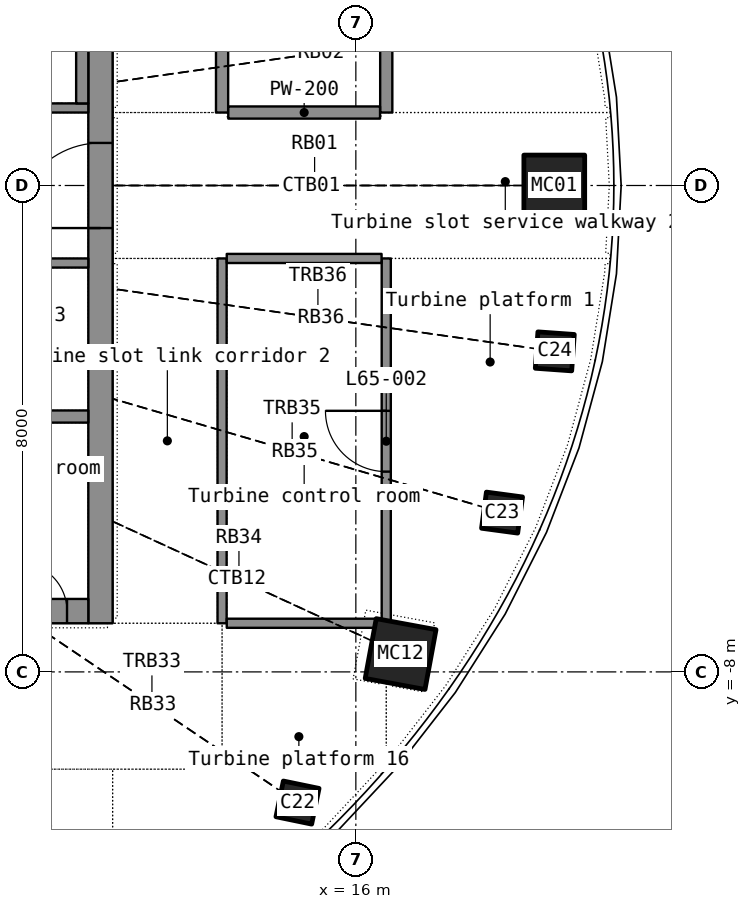
"""IFC4 building model, lengths in metres.
Left out: names, types, materials, properties, quantities, classifications, styles, units other than length and angle.
Written with IfcOpenShell. Run it as: python <this file> out.ifc"""

import sys

from ifc_helpers import new_model, si_unit, direction, frame, frame_2d, origin, origin_2d, place, context, subcontext, project, spatial, rectangle, hollow_rectangle, extrude, element, fill, save


model = new_model("IFC4")
c1 = context("Model", 3, precision=1e-05, world=origin(), true_north=direction((0.0, 1.0)))
c2 = subcontext(c1, "Body", "Model", "MODEL_VIEW")
j1 = project(units=[si_unit("LENGTHUNIT", "METRE"), si_unit("PLANEANGLEUNIT", "RADIAN")], contexts=[c1])
p1 = place(None, origin())
s1 = spatial("IfcSite", under=j1, at=p1, CompositionType="ELEMENT")
p2 = place(p1, origin())
s2 = spatial("IfcBuilding", under=s1, at=p2, CompositionType="ELEMENT")
p3 = place(p2, frame((0.0, 0.0, 265.2)))
s3 = spatial("IfcBuildingStorey", under=s2, at=p3, CompositionType="ELEMENT", Elevation=265.2)
p4 = place(p3, frame((19.263, 0.0, 0.0), z_axis=(-0.034587192, 0.0, 0.999401684), x_axis=(0.0, -1.0, 0.0)))
e1 = element("IfcColumn", 1, at=p4, inside=s3, PredefinedType="COLUMN", context=c2, shape_type="SweptSolid", body=[
    extrude(hollow_rectangle(XDim=1.0, YDim=1.0, WallThickness=0.032, at=origin_2d()), origin(), (0.0, 0.0, 1.0), 7.405),
])
p5 = place(p3, frame((15.041, -10.149, 0.0), z_axis=(-0.026511305, 0.018201791, 0.999482789), x_axis=(-0.721084308, -0.692816746, -0.006509747)))
e2 = element("IfcColumn", 2, at=p5, inside=s3, PredefinedType="COLUMN", context=c2, shape_type="SweptSolid", body=[
    extrude(hollow_rectangle(XDim=0.6, YDim=0.6, WallThickness=0.025, at=origin_2d()), origin(), (0.0, 0.0, 1.0), 7.404),
])
p6 = place(p3, frame((16.736, -7.706, 0.0), z_axis=(-0.02993968, 0.014178483, 0.999451142), x_axis=(-0.58479336, -0.811160032, -0.006010807)))
e3 = element("IfcColumn", 3, at=p6, inside=s3, PredefinedType="COLUMN", context=c2, shape_type="SweptSolid", body=[
    extrude(hollow_rectangle(XDim=1.0, YDim=1.0, WallThickness=0.032, at=origin_2d()), origin(), (0.0, 0.0, 1.0), 7.404),
])
p7 = place(p3, frame((18.404, -5.38, 0.0), z_axis=(-0.032477793, 0.009660907, 0.999425765), x_axis=(-0.410307078, -0.911936229, -0.004518332)))
e4 = element("IfcColumn", 4, at=p7, inside=s3, PredefinedType="COLUMN", context=c2, shape_type="SweptSolid", body=[
    extrude(hollow_rectangle(XDim=0.6, YDim=0.6, WallThickness=0.025, at=origin_2d()), origin(), (0.0, 0.0, 1.0), 7.404),
])
p8 = place(p3, frame((19.272, -2.728, 0.0), z_axis=(-0.034059852, 0.004912796, 0.99940772), x_axis=(-0.21296706, -0.977056295, -0.002455003)))
e5 = element("IfcColumn", 5, at=p8, inside=s3, PredefinedType="COLUMN", context=c2, shape_type="SweptSolid", body=[
    extrude(hollow_rectangle(XDim=0.6, YDim=0.6, WallThickness=0.025, at=origin_2d()), origin(), (0.0, 0.0, 1.0), 7.405),
])
p9 = place(p3, frame((11.8, -7.2, 0.0), z_axis=(0.0, 0.0, 1.0), x_axis=(0.0, 1.0, 0.0)))
e6 = element("IfcWall", 6, at=p9, inside=s3, PredefinedType="SHEAR", context=c2, shape_type="SweptSolid", body=[
    extrude(rectangle(XDim=14.4, YDim=0.4, at=frame_2d((7.2, 0.0))), origin(), (0.0, 0.0, 1.0), 6.9),
])
p10 = place(p9, frame((6.5, 0.0, 0.0)))
e7 = element("IfcOpeningElement", 7, at=p10, cuts=e6, PredefinedType="OPENING", context=c2, shape_type="SweptSolid", body=[
    extrude(rectangle(XDim=1.4, YDim=2.2, at=frame_2d((0.7, 1.1))), frame((0.0, 0.21, 0.0), z_axis=(0.0, -1.0, 0.0), x_axis=(1.0, 0.0, 0.0)), (0.0, 0.0, 1.0), 0.42),
])
p11 = place(p3, frame((-11.6, -7.0, 0.0), z_axis=(0.0, 0.0, 1.0), x_axis=(1.0, 0.0, 0.0)))
e8 = element("IfcWall", 8, at=p11, inside=s3, PredefinedType="SHEAR", context=c2, shape_type="SweptSolid", body=[
    extrude(rectangle(XDim=23.2, YDim=0.4, at=frame_2d((11.6, 0.0))), origin(), (0.0, 0.0, 1.0), 6.9),
])
p12 = place(p11, frame((20.05, 0.0, 0.0)))
e9 = element("IfcOpeningElement", 9, at=p12, cuts=e8, PredefinedType="OPENING", context=c2, shape_type="SweptSolid", body=[
    extrude(rectangle(XDim=1.1, YDim=2.2, at=frame_2d((0.55, 1.1))), frame((0.0, 0.21, 0.0), z_axis=(0.0, -1.0, 0.0), x_axis=(1.0, 0.0, 0.0)), (0.0, 0.0, 1.0), 0.42),
])
p13 = place(p11, frame((4.15, 0.0, 0.0)))
e10 = element("IfcOpeningElement", 10, at=p13, cuts=e8, PredefinedType="OPENING", context=c2, shape_type="SweptSolid", body=[
    extrude(rectangle(XDim=0.9, YDim=2.1, at=frame_2d((0.45, 1.05))), frame((0.0, 0.21, 0.0), z_axis=(0.0, -1.0, 0.0), x_axis=(1.0, 0.0, 0.0)), (0.0, 0.0, 1.0), 0.42),
])
p14 = place(p11, frame((11.15, 0.0, 0.0)))
e11 = element("IfcOpeningElement", 11, at=p14, cuts=e8, PredefinedType="OPENING", context=c2, shape_type="SweptSolid", body=[
    extrude(rectangle(XDim=0.9, YDim=2.1, at=frame_2d((0.45, 1.05))), frame((0.0, 0.21, 0.0), z_axis=(0.0, -1.0, 0.0), x_axis=(1.0, 0.0, 0.0)), (0.0, 0.0, 1.0), 0.42),
])
p15 = place(p11, frame((17.15, 0.0, 0.0)))
e12 = element("IfcOpeningElement", 12, at=p15, cuts=e8, PredefinedType="OPENING", context=c2, shape_type="SweptSolid", body=[
    extrude(rectangle(XDim=0.9, YDim=2.1, at=frame_2d((0.45, 1.05))), frame((0.0, 0.21, 0.0), z_axis=(0.0, -1.0, 0.0), x_axis=(1.0, 0.0, 0.0)), (0.0, 0.0, 1.0), 0.42),
])
p16 = place(p11, frame((0.35, 0.0, 0.0)))
e13 = element("IfcOpeningElement", 13, at=p16, cuts=e8, PredefinedType="OPENING", context=c2, shape_type="SweptSolid", body=[
    extrude(rectangle(XDim=0.8, YDim=2.05, at=frame_2d((0.4, 1.025))), frame((0.0, 0.21, 0.0), z_axis=(0.0, -1.0, 0.0), x_axis=(1.0, 0.0, 0.0)), (0.0, 0.0, 1.0), 0.42),
])
p17 = place(p11, frame((22.05, 0.0, 0.0)))
e14 = element("IfcOpeningElement", 14, at=p17, cuts=e8, PredefinedType="OPENING", context=c2, shape_type="SweptSolid", body=[
    extrude(rectangle(XDim=0.8, YDim=2.05, at=frame_2d((0.4, 1.025))), frame((0.0, 0.21, 0.0), z_axis=(0.0, -1.0, 0.0), x_axis=(1.0, 0.0, 0.0)), (0.0, 0.0, 1.0), 0.42),
])
p18 = place(p3, frame((-11.6, -3.8, 0.0), z_axis=(0.0, 0.0, 1.0), x_axis=(1.0, 0.0, 0.0)))
e15 = element("IfcWall", 15, at=p18, inside=s3, PredefinedType="SHEAR", context=c2, shape_type="SweptSolid", body=[
    extrude(rectangle(XDim=23.2, YDim=0.2, at=frame_2d((11.6, 0.0))), origin(), (0.0, 0.0, 1.0), 6.9),
])
p19 = place(p3, frame((3.0, -1.275, 0.0), z_axis=(0.0, 0.0, 1.0), x_axis=(1.0, 0.0, 0.0)))
e16 = element("IfcWall", 16, at=p19, inside=s3, PredefinedType="PARTITIONING", context=c2, shape_type="SweptSolid", body=[
    extrude(rectangle(XDim=8.6, YDim=0.15, at=frame_2d((4.3, 0.0))), origin(), (0.0, 0.0, 1.0), 6.9),
])
p20 = place(p19, frame((0.82, 0.0, 0.0)))
e17 = element("IfcOpeningElement", 17, at=p20, cuts=e16, PredefinedType="OPENING", context=c2, shape_type="SweptSolid", body=[
    extrude(rectangle(XDim=0.85, YDim=2.1, at=frame_2d((0.425, 1.05))), frame((0.0, 0.085, 0.0), z_axis=(0.0, -1.0, 0.0), x_axis=(1.0, 0.0, 0.0)), (0.0, 0.0, 1.0), 0.17),
])
p21 = place(p19, frame((3.103, 0.0, 0.0)))
e18 = element("IfcOpeningElement", 18, at=p21, cuts=e16, PredefinedType="OPENING", context=c2, shape_type="SweptSolid", body=[
    extrude(rectangle(XDim=0.9, YDim=2.1, at=frame_2d((0.45, 1.05))), frame((0.0, 0.085, 0.0), z_axis=(0.0, -1.0, 0.0), x_axis=(1.0, 0.0, 0.0)), (0.0, 0.0, 1.0), 0.17),
])
p22 = place(p19, frame((6.158, 0.0, 0.0)))
e19 = element("IfcOpeningElement", 19, at=p22, cuts=e16, PredefinedType="OPENING", context=c2, shape_type="SweptSolid", body=[
    extrude(rectangle(XDim=0.9, YDim=2.1, at=frame_2d((0.45, 1.05))), frame((0.0, 0.085, 0.0), z_axis=(0.0, -1.0, 0.0), x_axis=(1.0, 0.0, 0.0)), (0.0, 0.0, 1.0), 0.17),
])
p23 = place(p3, frame((3.0, 1.275, 0.0), z_axis=(0.0, 0.0, 1.0), x_axis=(1.0, 0.0, 0.0)))
e20 = element("IfcWall", 20, at=p23, inside=s3, PredefinedType="SHEAR", context=c2, shape_type="SweptSolid", body=[
    extrude(rectangle(XDim=8.6, YDim=0.15, at=frame_2d((4.3, 0.0))), origin(), (0.0, 0.0, 1.0), 6.9),
])
p24 = place(p23, frame((2.05, 0.0, 0.0)))
e21 = element("IfcOpeningElement", 21, at=p24, cuts=e20, PredefinedType="OPENING", context=c2, shape_type="SweptSolid", body=[
    extrude(rectangle(XDim=1.1, YDim=2.15, at=frame_2d((0.55, 1.075))), frame((0.0, 0.085, 0.0), z_axis=(0.0, -1.0, 0.0), x_axis=(1.0, 0.0, 0.0)), (0.0, 0.0, 1.0), 0.17),
])
p25 = place(p3, frame((11.5, 1.35, 0.0), z_axis=(0.0, 0.0, 1.0), x_axis=(0.0, 1.0, 0.0)))
e22 = element("IfcWall", 22, at=p25, inside=s3, PredefinedType="SHEAR", context=c2, shape_type="SweptSolid", body=[
    extrude(rectangle(XDim=2.35, YDim=0.2, at=frame_2d((1.175, 0.0))), origin(), (0.0, 0.0, 1.0), 6.9),
])
p26 = place(p3, frame((16.5, -7.212, 0.0), z_axis=(0.0, 0.0, 1.0), x_axis=(0.0, 1.0, 0.0)))
e23 = element("IfcWall", 23, at=p26, inside=s3, PredefinedType="PARTITIONING", context=c2, shape_type="SweptSolid", body=[
    extrude(rectangle(XDim=6.012, YDim=0.15, at=frame_2d((3.006, 0.0))), origin(), (0.0, 0.0, 1.0), 6.1),
])
p27 = place(p26, frame((2.506, 0.0, 0.0)))
e24 = element("IfcOpeningElement", 24, at=p27, cuts=e23, PredefinedType="OPENING", context=c2, shape_type="SweptSolid", body=[
    extrude(rectangle(XDim=1.0, YDim=2.2, at=frame_2d((0.5, 1.1))), frame((0.0, 0.085, 0.0), z_axis=(0.0, -1.0, 0.0), x_axis=(1.0, 0.0, 0.0)), (0.0, 0.0, 1.0), 0.17),
])
p28 = place(p3, frame((16.5, 1.2, 0.0), z_axis=(0.0, 0.0, 1.0), x_axis=(0.0, 1.0, 0.0)))
e25 = element("IfcWall", 25, at=p28, inside=s3, PredefinedType="PARTITIONING", context=c2, shape_type="SweptSolid", body=[
    extrude(rectangle(XDim=6.012, YDim=0.2, at=frame_2d((3.006, 0.0))), origin(), (0.0, 0.0, 1.0), 6.1),
])
p29 = place(p28, frame((2.556, 0.0, 0.0)))
e26 = element("IfcOpeningElement", 26, at=p29, cuts=e25, PredefinedType="OPENING", context=c2, shape_type="SweptSolid", body=[
    extrude(rectangle(XDim=0.9, YDim=2.1, at=frame_2d((0.45, 1.05))), frame((0.0, 0.11, 0.0), z_axis=(0.0, -1.0, 0.0), x_axis=(1.0, 0.0, 0.0)), (0.0, 0.0, 1.0), 0.22),
])
p30 = place(p3, frame((13.8, -7.2, 0.0), z_axis=(0.0, 0.0, 1.0), x_axis=(0.0, 1.0, 0.0)))
e27 = element("IfcWall", 27, at=p30, inside=s3, PredefinedType="PARTITIONING", context=c2, shape_type="SweptSolid", body=[
    extrude(rectangle(XDim=6.0, YDim=0.15, at=frame_2d((3.0, 0.0))), origin(), (0.0, 0.0, 1.0), 6.1),
])
p31 = place(p3, frame((13.8, 1.2, 0.0), z_axis=(0.0, 0.0, 1.0), x_axis=(0.0, 1.0, 0.0)))
e28 = element("IfcWall", 28, at=p31, inside=s3, PredefinedType="PARTITIONING", context=c2, shape_type="SweptSolid", body=[
    extrude(rectangle(XDim=6.0, YDim=0.2, at=frame_2d((3.0, 0.0))), origin(), (0.0, 0.0, 1.0), 6.1),
])
for number, where, z_axis, x_axis in (
    (29, (13.877, -7.2, 0.0), (0.0, 0.0, 1.0), (1.0, 0.0, 0.0)),
    (30, (13.877, -1.2, 0.0), (0.0, 0.0, 1.0), (1.0, 0.0, 0.0)),
):
    element("IfcWall", number, at=place(p3, frame(where, z_axis=z_axis, x_axis=x_axis)), inside=s3, PredefinedType="PARTITIONING", context=c2, shape_type="SweptSolid", body=[
        extrude(rectangle(XDim=2.546, YDim=0.15, at=frame_2d((1.273, 0.0))), origin(), (0.0, 0.0, 1.0), 6.1),
    ])
p32 = place(p3, frame((16.398, 1.2, 0.0), z_axis=(0.0, 0.0, 1.0), x_axis=(-1.0, 0.0, 0.0)))
e31 = element("IfcWall", 31, at=p32, inside=s3, PredefinedType="PARTITIONING", context=c2, shape_type="SweptSolid", body=[
    extrude(rectangle(XDim=2.496, YDim=0.2, at=frame_2d((1.248, 0.0))), origin(), (0.0, 0.0, 1.0), 6.1),
])
p33 = place(p17, origin())
e32 = element("IfcDoor", 32, at=p33, inside=s3, OperationType="SINGLE_SWING_LEFT", PredefinedType="DOOR", context=c2, shape_type="SweptSolid", body=[
    extrude(rectangle(XDim=0.8, YDim=2.05, at=frame_2d((0.4, 1.025))), frame((0.0, 0.025, 0.0), z_axis=(0.0, -1.0, 0.0), x_axis=(1.0, 0.0, 0.0)), (0.0, 0.0, 1.0), 0.05),
])
fill(e14, e32)
p34 = place(p10, origin())
e33 = element("IfcDoor", 33, at=p34, inside=s3, OperationType="DOUBLE_DOOR_SINGLE_SWING", PredefinedType="DOOR", context=c2, shape_type="SweptSolid", body=[
    extrude(rectangle(XDim=1.4, YDim=2.2, at=frame_2d((0.7, 1.1))), frame((0.0, 0.025, 0.0), z_axis=(0.0, -1.0, 0.0), x_axis=(1.0, 0.0, 0.0)), (0.0, 0.0, 1.0), 0.05),
])
fill(e7, e33)
p35 = place(p27, origin())
e34 = element("IfcDoor", 34, at=p35, inside=s3, OperationType="SINGLE_SWING_RIGHT", PredefinedType="DOOR", context=c2, shape_type="SweptSolid", body=[
    extrude(rectangle(XDim=1.0, YDim=2.2, at=frame_2d((0.5, 1.1))), frame((0.0, 0.025, 0.0), z_axis=(0.0, -1.0, 0.0), x_axis=(1.0, 0.0, 0.0)), (0.0, 0.0, 1.0), 0.05),
])
fill(e24, e34)
save(model, sys.argv[1])
